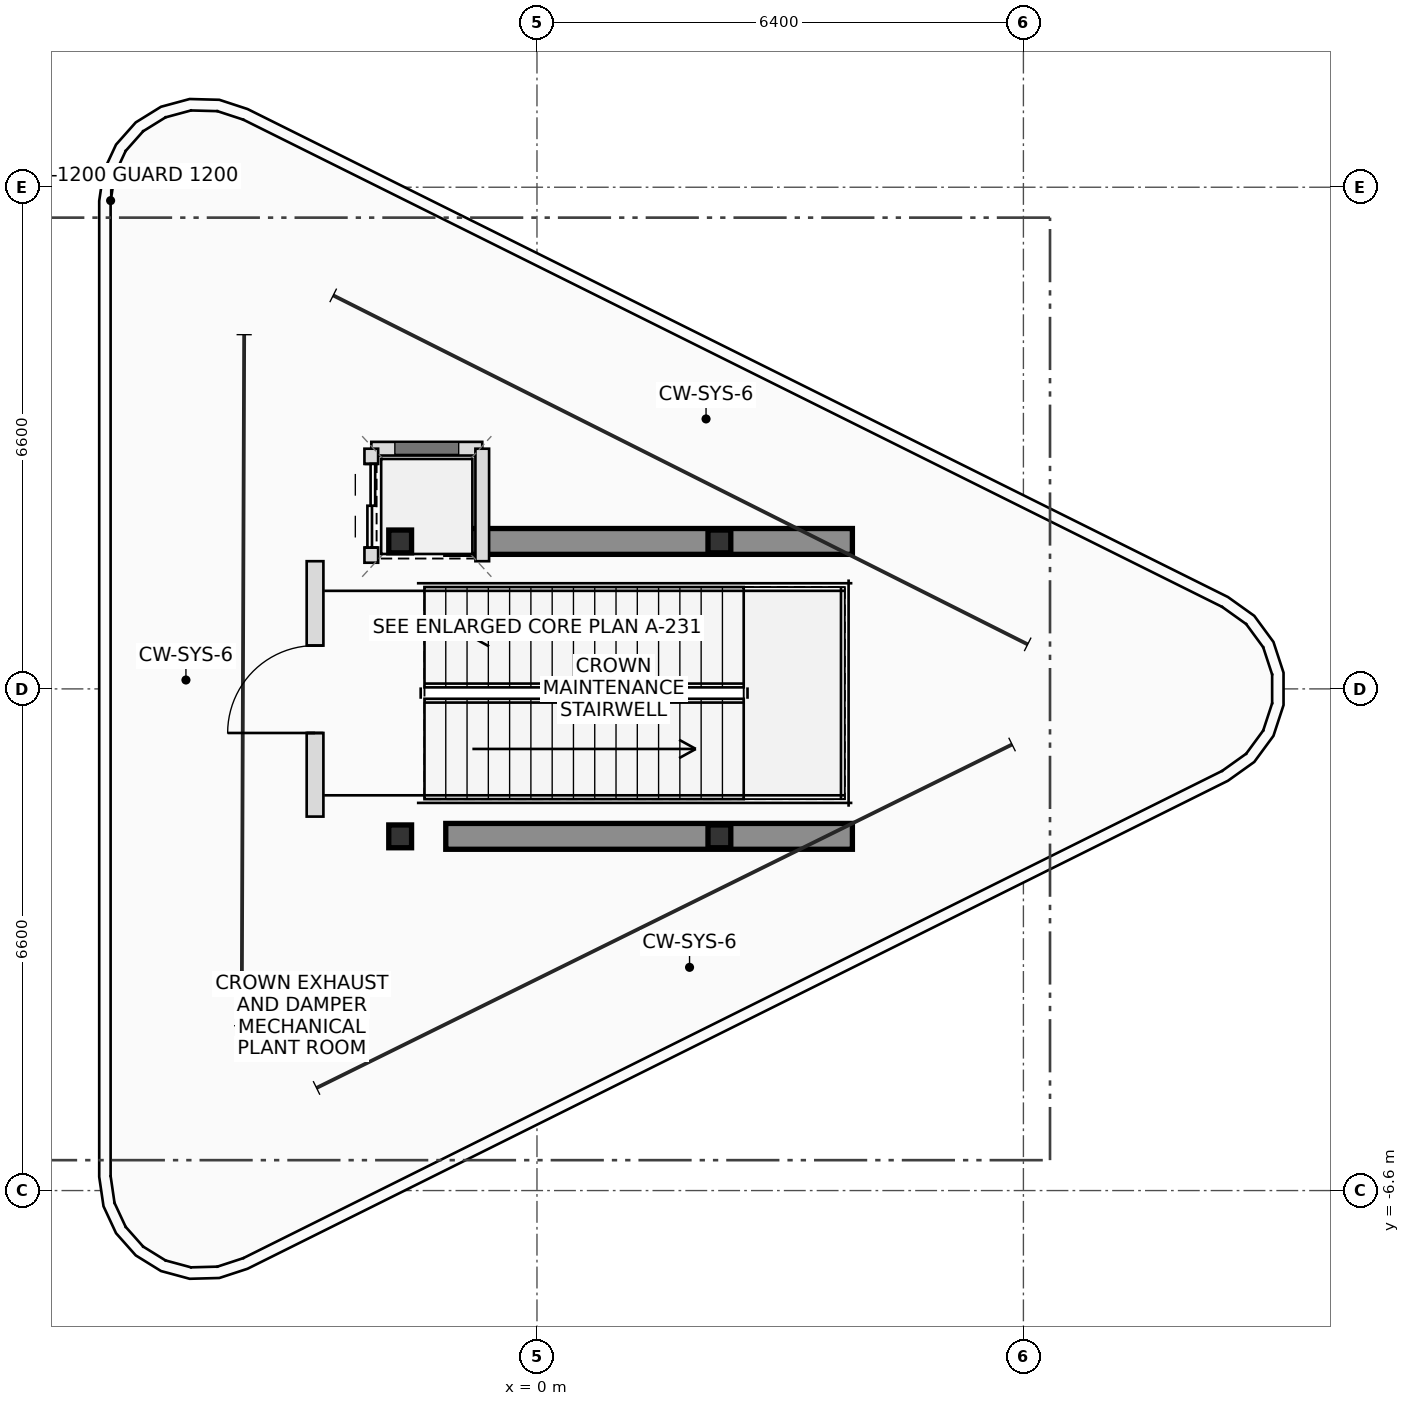
"""IFC4 building model, lengths in metres.
Left out: names, types, materials, properties, quantities, classifications, styles, units other than length and angle.
Written with IfcOpenShell. Run it as: python <this file> out.ifc"""

import sys

from ifc_helpers import new_model, si_unit, direction, frame, frame_2d, origin, origin_2d, place, context, subcontext, project, spatial, rectangle, i_section, extrude, source, transform, mapped, element, fill, save


model = new_model("IFC4")
c1 = context("Model", 3, precision=1e-05, world=origin(), true_north=direction((0.0, 1.0)))
c2 = subcontext(c1, "Body", "Model", "MODEL_VIEW")
j1 = project(units=[si_unit("LENGTHUNIT", "METRE"), si_unit("PLANEANGLEUNIT", "RADIAN")], contexts=[c1])
p1 = place(None, origin())
s1 = spatial("IfcSite", under=j1, at=p1, CompositionType="ELEMENT")
p2 = place(p1, origin())
s2 = spatial("IfcBuilding", under=s1, at=p2, CompositionType="ELEMENT")
p3 = place(p2, frame((0.0, 0.0, 338.65)))
s3 = spatial("IfcBuildingStorey", under=s2, at=p3, CompositionType="ELEMENT", Elevation=338.65)
m1 = source(origin(), c2, "Body", "SweptSolid", [
    extrude(i_section(OverallWidth=0.3, OverallDepth=0.3, WebThickness=0.01, FlangeThickness=0.015, FilletRadius=0.018, at=origin_2d()), origin(), (0.0, 0.0, 1.0), 5.2),
])
for number, where, z_axis, x_axis in (
    (1, (-1.8, -1.94, 0.0), (0.0, 0.0, 1.0), (1.0, 0.0, 0.0)),
    (2, (2.4, 1.94, 0.0), (0.0, 0.0, 1.0), (1.0, 0.0, 0.0)),
    (3, (2.4, -1.94, 0.0), (0.0, 0.0, 1.0), (1.0, 0.0, 0.0)),
    (4, (-1.8, 1.94, 0.0), (0.0, 0.0, 1.0), (1.0, 0.0, 0.0)),
):
    element("IfcColumn", number, at=place(p3, frame(where, z_axis=z_axis, x_axis=x_axis)), inside=s3, PredefinedType="COLUMN", context=c2, shape_type="MappedRepresentation", body=[
        mapped(m1, transform((0.0, 0.0, 0.0), scale=1.0)),
    ])
for number, where, z_axis, x_axis in (
    (5, (-1.2, 1.94, 0.0), (0.0, 0.0, 1.0), (1.0, 0.0, 0.0)),
    (6, (-1.2, -1.94, 0.0), (0.0, 0.0, 1.0), (1.0, 0.0, 0.0)),
):
    element("IfcWall", number, at=place(p3, frame(where, z_axis=z_axis, x_axis=x_axis)), inside=s3, PredefinedType="SHEAR", context=c2, shape_type="SweptSolid", body=[
        extrude(rectangle(XDim=5.35, YDim=0.34, at=frame_2d((2.675, 0.0))), origin(), (0.0, 0.0, 1.0), 5.2),
    ])
p4 = place(p3, frame((-2.18, 3.16, 0.0), z_axis=(0.0, 0.0, 1.0), x_axis=(1.0, 0.0, 0.0)))
e7 = element("IfcWall", 7, at=p4, inside=s3, PredefinedType="PLUMBINGWALL", context=c2, shape_type="SweptSolid", body=[
    extrude(rectangle(XDim=1.46, YDim=0.18, at=frame_2d((0.73, 0.0))), origin(), (0.0, 0.0, 1.0), 4.92),
])
p5 = place(p3, frame((-2.18, 1.66, 0.0), z_axis=(0.0, 0.0, 1.0), x_axis=(0.0, 1.0, 0.0)))
e8 = element("IfcWall", 8, at=p5, inside=s3, PredefinedType="PLUMBINGWALL", context=c2, shape_type="SweptSolid", body=[
    extrude(rectangle(XDim=1.5, YDim=0.18, at=frame_2d((0.75, 0.0))), origin(), (0.0, 0.0, 1.0), 4.92),
])
p6 = place(p5, frame((0.2, 0.0, 0.0)))
e9 = element("IfcOpeningElement", 9, at=p6, cuts=e8, PredefinedType="OPENING", context=c2, shape_type="SweptSolid", body=[
    extrude(rectangle(XDim=1.1, YDim=2.2, at=frame_2d((0.55, 1.1))), frame((0.0, 0.1, 0.0), z_axis=(0.0, -1.0, 0.0), x_axis=(1.0, 0.0, 0.0)), (0.0, 0.0, 1.0), 0.2),
])
p7 = place(p3, frame((-0.72, 1.68, 0.0), z_axis=(0.0, 0.0, 1.0), x_axis=(0.0, 1.0, 0.0)))
e10 = element("IfcWall", 10, at=p7, inside=s3, PredefinedType="PLUMBINGWALL", context=c2, shape_type="SweptSolid", body=[
    extrude(rectangle(XDim=1.48, YDim=0.18, at=frame_2d((0.74, 0.0))), origin(), (0.0, 0.0, 1.0), 4.325),
])
p8 = place(p3, frame((-2.92, -1.68, 0.0), z_axis=(0.0, 0.0, 1.0), x_axis=(0.0, 1.0, 0.0)))
e11 = element("IfcWall", 11, at=p8, inside=s3, PredefinedType="PLUMBINGWALL", context=c2, shape_type="SweptSolid", body=[
    extrude(rectangle(XDim=3.36, YDim=0.22, at=frame_2d((1.68, 0.0))), origin(), (0.0, 0.0, 1.0), 4.92),
])
p9 = place(p8, frame((1.1, 0.0, 0.0)))
e12 = element("IfcOpeningElement", 12, at=p9, cuts=e11, PredefinedType="OPENING", context=c2, shape_type="SweptSolid", body=[
    extrude(rectangle(XDim=1.15, YDim=2.15, at=frame_2d((0.575, 1.075))), frame((0.0, 0.12, 0.0), z_axis=(0.0, -1.0, 0.0), x_axis=(1.0, 0.0, 0.0)), (0.0, 0.0, 1.0), 0.24),
])
p10 = place(p6, origin())
e13 = element("IfcDoor", 13, at=p10, inside=s3, OperationType="DOUBLE_DOOR_SLIDING", PredefinedType="DOOR", context=c2, shape_type="SweptSolid", body=[
    extrude(rectangle(XDim=1.1, YDim=2.2, at=frame_2d((0.55, 1.1))), frame((0.0, 0.025, 0.0), z_axis=(0.0, -1.0, 0.0), x_axis=(1.0, 0.0, 0.0)), (0.0, 0.0, 1.0), 0.05),
])
fill(e9, e13)
p11 = place(p9, origin())
e14 = element("IfcDoor", 14, at=p11, inside=s3, OperationType="SINGLE_SWING_LEFT", PredefinedType="DOOR", context=c2, shape_type="SweptSolid", body=[
    extrude(rectangle(XDim=1.15, YDim=2.15, at=frame_2d((0.575, 1.075))), frame((0.0, 0.025, 0.0), z_axis=(0.0, -1.0, 0.0), x_axis=(1.0, 0.0, 0.0)), (0.0, 0.0, 1.0), 0.05),
])
fill(e12, e14)
save(model, sys.argv[1])
